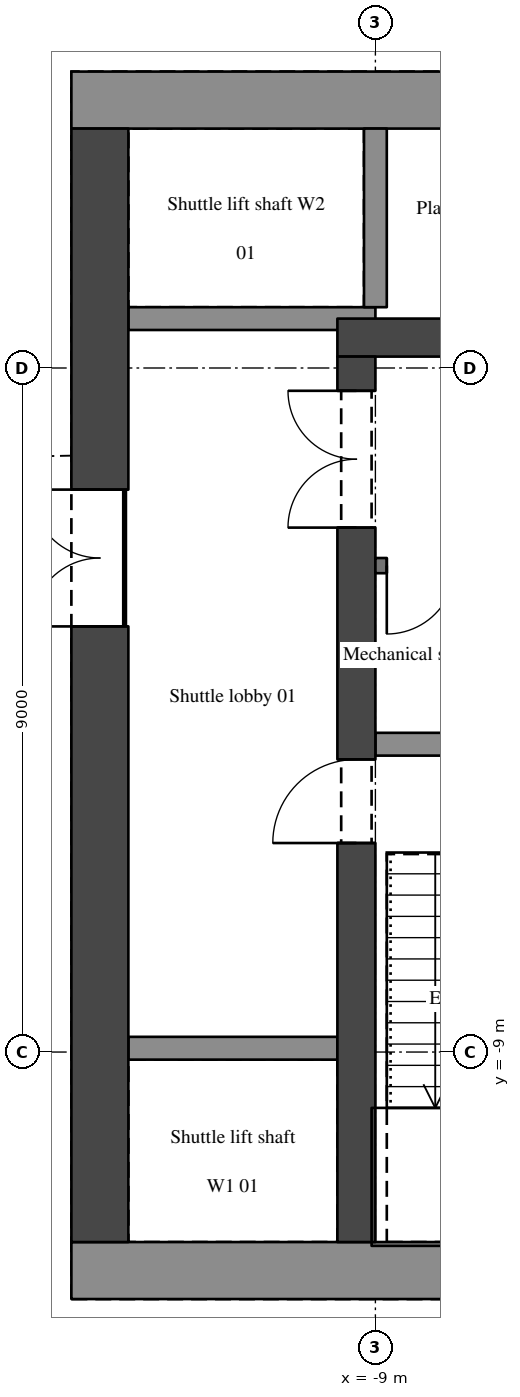
"""IFC4 building model, lengths in metres.
Left out: names, types, materials, properties, quantities, classifications, styles, units other than length and angle.
Written with IfcOpenShell. Run it as: python <this file> out.ifc"""

import sys

from ifc_helpers import new_model, si_unit, direction, frame, frame_2d, origin, place, context, subcontext, project, spatial, rectangle, extrude, element, fill, save


model = new_model("IFC4")
c1 = context("Model", 3, precision=1e-05, world=origin(), true_north=direction((0.0, 1.0)))
c2 = subcontext(c1, "Body", "Model", "MODEL_VIEW")
j1 = project(units=[si_unit("LENGTHUNIT", "METRE"), si_unit("PLANEANGLEUNIT", "RADIAN")], contexts=[c1])
p1 = place(None, origin())
s1 = spatial("IfcSite", under=j1, at=p1, CompositionType="ELEMENT")
p2 = place(p1, origin())
s2 = spatial("IfcBuilding", under=s1, at=p2, CompositionType="ELEMENT")
p3 = place(p2, frame((0.0, 0.0, 167.7)))
s3 = spatial("IfcBuildingStorey", under=s2, at=p3, CompositionType="ELEMENT", Elevation=167.7)
for number, where, z_axis, x_axis in (
    (1, (-13.0, -11.875, 0.0), (0.0, 0.0, 1.0), (1.0, 0.0, 0.0)),
    (2, (-13.0, 3.525, 0.0), (0.0, 0.0, 1.0), (1.0, 0.0, 0.0)),
):
    element("IfcWall", number, at=place(p3, frame(where, z_axis=z_axis, x_axis=x_axis)), inside=s3, PredefinedType="SHEAR", context=c2, shape_type="SweptSolid", body=[
        extrude(rectangle(XDim=26.0, YDim=0.75, at=frame_2d((13.0, 0.0))), origin(), (0.0, 0.0, 1.0), 4.5),
    ])
p4 = place(p3, frame((-12.625, -11.5, 0.0), z_axis=(0.0, 0.0, 1.0), x_axis=(0.0, 1.0, 0.0)))
e3 = element("IfcWall", 3, at=p4, inside=s3, PredefinedType="SHEAR", context=c2, shape_type="SweptSolid", body=[
    extrude(rectangle(XDim=14.65, YDim=0.75, at=frame_2d((7.325, 0.0))), origin(), (0.0, 0.0, 1.0), 4.5),
])
p5 = place(p4, frame((8.1, 0.0, 0.0)))
e4 = element("IfcOpeningElement", 4, at=p5, cuts=e3, PredefinedType="OPENING", context=c2, shape_type="SweptSolid", body=[
    extrude(rectangle(XDim=1.8, YDim=2.1, at=frame_2d((0.9, 1.05))), frame((0.0, 0.385, 0.0), z_axis=(0.0, -1.0, 0.0), x_axis=(1.0, 0.0, 0.0)), (0.0, 0.0, 1.0), 0.77),
])
p6 = place(p3, frame((-9.5, 0.4, 0.0), z_axis=(0.0, 0.0, 1.0), x_axis=(1.0, 0.0, 0.0)))
e5 = element("IfcWall", 5, at=p6, inside=s3, PredefinedType="SHEAR", context=c2, shape_type="SweptSolid", body=[
    extrude(rectangle(XDim=19.0, YDim=0.5, at=frame_2d((9.5, 0.0))), origin(), (0.0, 0.0, 1.0), 4.5),
])
p7 = place(p6, frame((1.4, 0.0, 0.0)))
e6 = element("IfcOpeningElement", 6, at=p7, cuts=e5, PredefinedType="OPENING", context=c2, shape_type="SweptSolid", body=[
    extrude(rectangle(XDim=0.9, YDim=2.1, at=frame_2d((0.45, 1.05))), frame((0.0, 0.26, 0.0), z_axis=(0.0, -1.0, 0.0), x_axis=(1.0, 0.0, 0.0)), (0.0, 0.0, 1.0), 0.52),
])
p8 = place(p6, frame((4.1, 0.0, 0.0)))
e7 = element("IfcOpeningElement", 7, at=p8, cuts=e5, PredefinedType="OPENING", context=c2, shape_type="SweptSolid", body=[
    extrude(rectangle(XDim=0.9, YDim=2.1, at=frame_2d((0.45, 1.05))), frame((0.0, 0.26, 0.0), z_axis=(0.0, -1.0, 0.0), x_axis=(1.0, 0.0, 0.0)), (0.0, 0.0, 1.0), 0.52),
])
p9 = place(p6, frame((6.8, 0.0, 0.0)))
e8 = element("IfcOpeningElement", 8, at=p9, cuts=e5, PredefinedType="OPENING", context=c2, shape_type="SweptSolid", body=[
    extrude(rectangle(XDim=0.9, YDim=2.1, at=frame_2d((0.45, 1.05))), frame((0.0, 0.26, 0.0), z_axis=(0.0, -1.0, 0.0), x_axis=(1.0, 0.0, 0.0)), (0.0, 0.0, 1.0), 0.52),
])
p10 = place(p6, frame((11.3, 0.0, 0.0)))
e9 = element("IfcOpeningElement", 9, at=p10, cuts=e5, PredefinedType="OPENING", context=c2, shape_type="SweptSolid", body=[
    extrude(rectangle(XDim=0.9, YDim=2.1, at=frame_2d((0.45, 1.05))), frame((0.0, 0.26, 0.0), z_axis=(0.0, -1.0, 0.0), x_axis=(1.0, 0.0, 0.0)), (0.0, 0.0, 1.0), 0.52),
])
p11 = place(p6, frame((14.0, 0.0, 0.0)))
e10 = element("IfcOpeningElement", 10, at=p11, cuts=e5, PredefinedType="OPENING", context=c2, shape_type="SweptSolid", body=[
    extrude(rectangle(XDim=0.9, YDim=2.1, at=frame_2d((0.45, 1.05))), frame((0.0, 0.26, 0.0), z_axis=(0.0, -1.0, 0.0), x_axis=(1.0, 0.0, 0.0)), (0.0, 0.0, 1.0), 0.52),
])
p12 = place(p6, frame((16.7, 0.0, 0.0)))
e11 = element("IfcOpeningElement", 11, at=p12, cuts=e5, PredefinedType="OPENING", context=c2, shape_type="SweptSolid", body=[
    extrude(rectangle(XDim=0.9, YDim=2.1, at=frame_2d((0.45, 1.05))), frame((0.0, 0.26, 0.0), z_axis=(0.0, -1.0, 0.0), x_axis=(1.0, 0.0, 0.0)), (0.0, 0.0, 1.0), 0.52),
])
p13 = place(p6, frame((9.05, 0.0, 0.0)))
e12 = element("IfcOpeningElement", 12, at=p13, cuts=e5, PredefinedType="OPENING", context=c2, shape_type="SweptSolid", body=[
    extrude(rectangle(XDim=0.9, YDim=2.1, at=frame_2d((0.45, 1.05))), frame((0.0, 0.26, 0.0), z_axis=(0.0, -1.0, 0.0), x_axis=(1.0, 0.0, 0.0)), (0.0, 0.0, 1.0), 0.52),
])
p14 = place(p3, frame((-9.25, -11.5, 0.0), z_axis=(0.0, 0.0, 1.0), x_axis=(0.0, 1.0, 0.0)))
e13 = element("IfcWall", 13, at=p14, inside=s3, PredefinedType="SHEAR", context=c2, shape_type="SweptSolid", body=[
    extrude(rectangle(XDim=11.65, YDim=0.5, at=frame_2d((5.825, 0.0))), origin(), (0.0, 0.0, 1.0), 4.5),
])
p15 = place(p14, frame((9.4, 0.0, 0.0)))
e14 = element("IfcOpeningElement", 14, at=p15, cuts=e13, PredefinedType="OPENING", context=c2, shape_type="SweptSolid", body=[
    extrude(rectangle(XDim=1.8, YDim=2.1, at=frame_2d((0.9, 1.05))), frame((0.0, 0.26, 0.0), z_axis=(0.0, -1.0, 0.0), x_axis=(1.0, 0.0, 0.0)), (0.0, 0.0, 1.0), 0.52),
])
p16 = place(p14, frame((5.25, 0.0, 0.0)))
e15 = element("IfcOpeningElement", 15, at=p16, cuts=e13, PredefinedType="OPENING", context=c2, shape_type="SweptSolid", body=[
    extrude(rectangle(XDim=1.1, YDim=2.1, at=frame_2d((0.55, 1.05))), frame((0.0, 0.26, 0.0), z_axis=(0.0, -1.0, 0.0), x_axis=(1.0, 0.0, 0.0)), (0.0, 0.0, 1.0), 0.52),
])
p17 = place(p3, frame((-12.25, -8.95, 0.0), z_axis=(0.0, 0.0, 1.0), x_axis=(1.0, 0.0, 0.0)))
e16 = element("IfcWall", 16, at=p17, inside=s3, PredefinedType="SHEAR", context=c2, shape_type="SweptSolid", body=[
    extrude(rectangle(XDim=2.75, YDim=0.3, at=frame_2d((1.375, 0.0))), origin(), (0.0, 0.0, 1.0), 4.5),
])
p18 = place(p3, frame((-9.0, -4.95, 0.0), z_axis=(0.0, 0.0, 1.0), x_axis=(1.0, 0.0, 0.0)))
e17 = element("IfcWall", 17, at=p18, inside=s3, PredefinedType="SHEAR", context=c2, shape_type="SweptSolid", body=[
    extrude(rectangle(XDim=6.75, YDim=0.3, at=frame_2d((3.375, 0.0))), origin(), (0.0, 0.0, 1.0), 4.5),
])
p19 = place(p3, frame((-7.8, -2.6, 0.0), z_axis=(0.0, 0.0, 1.0), x_axis=(-1.0, 0.0, 0.0)))
e18 = element("IfcWall", 18, at=p19, inside=s3, PredefinedType="SOLIDWALL", context=c2, shape_type="SweptSolid", body=[
    extrude(rectangle(XDim=1.2, YDim=0.2, at=frame_2d((0.6, 0.0))), origin(), (0.0, 0.0, 1.0), 4.2),
])
p20 = place(p19, frame((0.15, 0.0, 0.0)))
e19 = element("IfcOpeningElement", 19, at=p20, cuts=e18, PredefinedType="OPENING", context=c2, shape_type="SweptSolid", body=[
    extrude(rectangle(XDim=0.9, YDim=2.1, at=frame_2d((0.45, 1.05))), frame((0.0, 0.11, 0.0), z_axis=(0.0, -1.0, 0.0), x_axis=(1.0, 0.0, 0.0)), (0.0, 0.0, 1.0), 0.22),
])
p21 = place(p3, frame((-9.0, 0.65, 0.0), z_axis=(0.0, 0.0, 1.0), x_axis=(-1.0, 0.0, 0.0)))
e20 = element("IfcWall", 20, at=p21, inside=s3, PredefinedType="SHEAR", context=c2, shape_type="SweptSolid", body=[
    extrude(rectangle(XDim=3.25, YDim=0.3, at=frame_2d((1.625, 0.0))), origin(), (0.0, 0.0, 1.0), 4.5),
])
p22 = place(p3, frame((-9.0, 0.8, 0.0), z_axis=(0.0, 0.0, 1.0), x_axis=(0.0, 1.0, 0.0)))
e21 = element("IfcWall", 21, at=p22, inside=s3, PredefinedType="SHEAR", context=c2, shape_type="SweptSolid", body=[
    extrude(rectangle(XDim=2.35, YDim=0.3, at=frame_2d((1.175, 0.0))), origin(), (0.0, 0.0, 1.0), 4.5),
])
p23 = place(p15, origin())
e22 = element("IfcDoor", 22, at=p23, inside=s3, OperationType="DOUBLE_DOOR_SINGLE_SWING", PredefinedType="DOOR", context=c2, shape_type="SweptSolid", body=[
    extrude(rectangle(XDim=1.8, YDim=2.1, at=frame_2d((0.9, 1.05))), frame((0.0, 0.025, 0.0), z_axis=(0.0, -1.0, 0.0), x_axis=(1.0, 0.0, 0.0)), (0.0, 0.0, 1.0), 0.05),
])
fill(e14, e22)
p24 = place(p16, origin())
e23 = element("IfcDoor", 23, at=p24, inside=s3, OperationType="SINGLE_SWING_LEFT", PredefinedType="DOOR", context=c2, shape_type="SweptSolid", body=[
    extrude(rectangle(XDim=1.1, YDim=2.1, at=frame_2d((0.55, 1.05))), frame((0.0, 0.025, 0.0), z_axis=(0.0, -1.0, 0.0), x_axis=(1.0, 0.0, 0.0)), (0.0, 0.0, 1.0), 0.05),
])
fill(e15, e23)
p25 = place(p20, origin())
e24 = element("IfcDoor", 24, at=p25, inside=s3, OperationType="SINGLE_SWING_RIGHT", PredefinedType="DOOR", context=c2, shape_type="SweptSolid", body=[
    extrude(rectangle(XDim=0.9, YDim=2.1, at=frame_2d((0.45, 1.05))), frame((0.0, 0.025, 0.0), z_axis=(0.0, -1.0, 0.0), x_axis=(1.0, 0.0, 0.0)), (0.0, 0.0, 1.0), 0.05),
])
fill(e19, e24)
p26 = place(p5, origin())
e25 = element("IfcDoor", 25, at=p26, inside=s3, OperationType="DOUBLE_DOOR_SINGLE_SWING", PredefinedType="DOOR", context=c2, shape_type="SweptSolid", body=[
    extrude(rectangle(XDim=1.8, YDim=2.1, at=frame_2d((0.9, 1.05))), frame((0.0, 0.025, 0.0), z_axis=(0.0, -1.0, 0.0), x_axis=(1.0, 0.0, 0.0)), (0.0, 0.0, 1.0), 0.05),
])
fill(e4, e25)
save(model, sys.argv[1])
